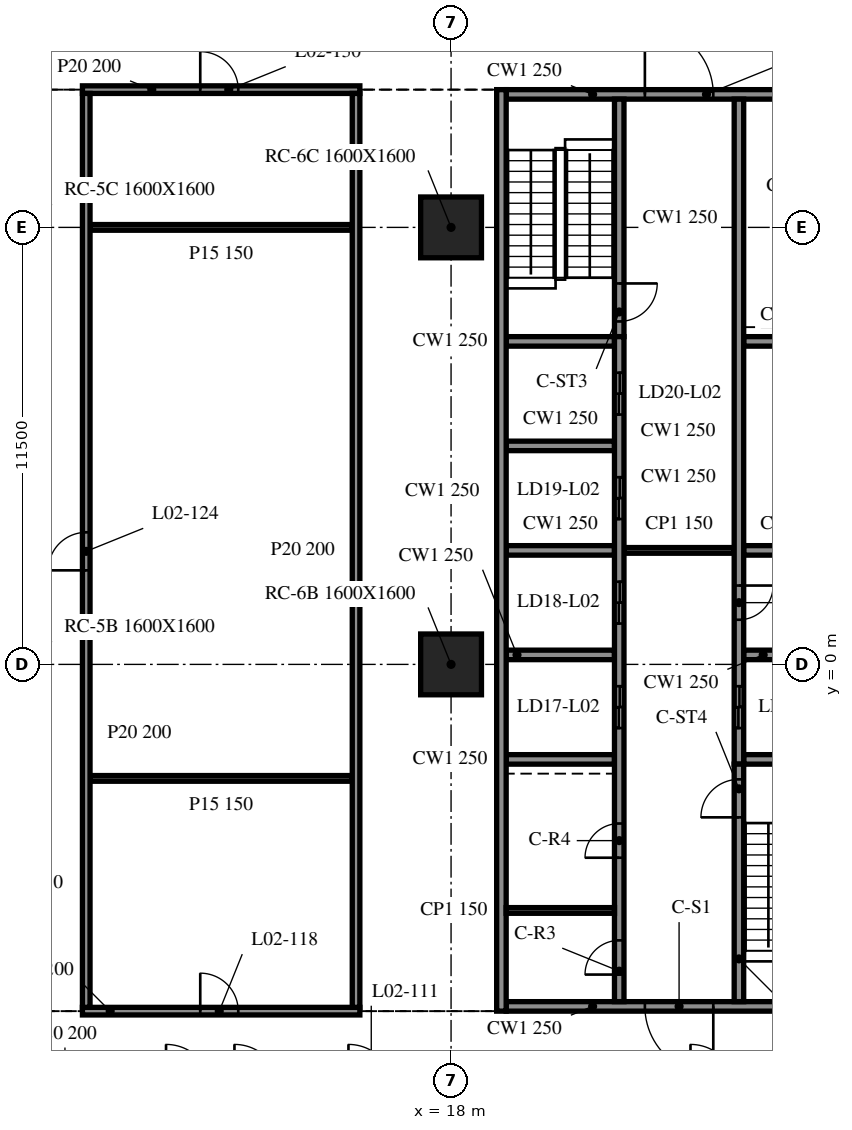
"""IFC4 building model, lengths in metres.
Left out: names, types, materials, properties, quantities, classifications, styles, units other than length and angle.
Written with IfcOpenShell. Run it as: python <this file> out.ifc"""

import sys

from ifc_helpers import new_model, si_unit, direction, frame, frame_2d, origin, origin_2d, place, context, subcontext, project, spatial, rectangle, extrude, element, fill, save


model = new_model("IFC4")
c1 = context("Model", 3, precision=1e-05, world=origin(), true_north=direction((0.0, 1.0)))
c2 = subcontext(c1, "Body", "Model", "MODEL_VIEW")
j1 = project(units=[si_unit("LENGTHUNIT", "METRE"), si_unit("PLANEANGLEUNIT", "RADIAN")], contexts=[c1])
p1 = place(None, origin())
s1 = spatial("IfcSite", under=j1, at=p1, CompositionType="ELEMENT")
p2 = place(p1, origin())
s2 = spatial("IfcBuilding", under=s1, at=p2, CompositionType="ELEMENT")
p3 = place(p2, frame((0.0, 0.0, 11.5)))
s3 = spatial("IfcBuildingStorey", under=s2, at=p3, CompositionType="ELEMENT", Elevation=11.5)
for number, where, z_axis, x_axis in (
    (1, (18.0, 0.0, -0.34), (0.0, 0.0, 1.0), (1.0, 0.0, 0.0)),
    (2, (18.0, 11.5, -0.34), (0.0, 0.0, 1.0), (1.0, 0.0, 0.0)),
):
    element("IfcColumn", number, at=place(p3, frame(where, z_axis=z_axis, x_axis=x_axis)), inside=s3, PredefinedType="COLUMN", context=c2, shape_type="SweptSolid", body=[
        extrude(rectangle(XDim=1.6, YDim=1.6, at=origin_2d()), origin(), (0.0, 0.0, 1.0), 4.3),
    ])
p4 = place(p3, frame((19.325, 15.125, 0.0), z_axis=(0.0, 0.0, 1.0), x_axis=(0.0, -1.0, 0.0)))
e3 = element("IfcWall", 3, at=p4, inside=s3, PredefinedType="SOLIDWALL", context=c2, shape_type="SweptSolid", body=[
    extrude(rectangle(XDim=24.25, YDim=0.25, at=frame_2d((12.125, 0.0))), origin(), (0.0, 0.0, 1.0), 3.96),
])
p5 = place(p3, frame((28.55, -9.0, 0.0), z_axis=(0.0, 0.0, 1.0), x_axis=(-1.0, 0.0, 0.0)))
e4 = element("IfcWall", 4, at=p5, inside=s3, PredefinedType="SOLIDWALL", context=c2, shape_type="SweptSolid", body=[
    extrude(rectangle(XDim=9.1, YDim=0.25, at=frame_2d((4.55, 0.0))), origin(), (0.0, 0.0, 1.0), 3.96),
])
p6 = place(p5, frame((3.65, 0.0, 0.0)))
e5 = element("IfcOpeningElement", 5, at=p6, cuts=e4, PredefinedType="OPENING", context=c2, shape_type="SweptSolid", body=[
    extrude(rectangle(XDim=1.8, YDim=2.1, at=frame_2d((0.9, 1.05))), frame((0.0, 0.135, 0.0), z_axis=(0.0, -1.0, 0.0), x_axis=(1.0, 0.0, 0.0)), (0.0, 0.0, 1.0), 0.27),
])
p7 = place(p3, frame((19.45, 15.0, 0.0), z_axis=(0.0, 0.0, 1.0), x_axis=(1.0, 0.0, 0.0)))
e6 = element("IfcWall", 6, at=p7, inside=s3, PredefinedType="SOLIDWALL", context=c2, shape_type="SweptSolid", body=[
    extrude(rectangle(XDim=9.1, YDim=0.25, at=frame_2d((4.55, 0.0))), origin(), (0.0, 0.0, 1.0), 3.96),
])
p8 = place(p7, frame((3.65, 0.0, 0.0)))
e7 = element("IfcOpeningElement", 7, at=p8, cuts=e6, PredefinedType="OPENING", context=c2, shape_type="SweptSolid", body=[
    extrude(rectangle(XDim=1.8, YDim=2.1, at=frame_2d((0.9, 1.05))), frame((0.0, 0.135, 0.0), z_axis=(0.0, -1.0, 0.0), x_axis=(1.0, 0.0, 0.0)), (0.0, 0.0, 1.0), 0.27),
])
p9 = place(p3, frame((22.425, -8.875, 0.0), z_axis=(0.0, 0.0, 1.0), x_axis=(0.0, 1.0, 0.0)))
e8 = element("IfcWall", 8, at=p9, inside=s3, PredefinedType="SOLIDWALL", context=c2, shape_type="SweptSolid", body=[
    extrude(rectangle(XDim=17.5, YDim=0.25, at=frame_2d((8.75, 0.0))), origin(), (0.0, 0.0, 1.0), 3.96),
])
p10 = place(p9, frame((7.2, 0.0, 0.0)))
e9 = element("IfcOpeningElement", 9, at=p10, cuts=e8, PredefinedType="OPENING", context=c2, shape_type="SweptSolid", body=[
    extrude(rectangle(XDim=1.1, YDim=2.1, at=frame_2d((0.55, 1.05))), frame((0.0, 0.135, 0.0), z_axis=(0.0, -1.0, 0.0), x_axis=(1.0, 0.0, 0.0)), (0.0, 0.0, 1.0), 0.27),
])
p11 = place(p9, frame((9.95, 0.0, 0.0)))
e10 = element("IfcOpeningElement", 10, at=p11, cuts=e8, PredefinedType="OPENING", context=c2, shape_type="SweptSolid", body=[
    extrude(rectangle(XDim=1.1, YDim=2.1, at=frame_2d((0.55, 1.05))), frame((0.0, 0.135, 0.0), z_axis=(0.0, -1.0, 0.0), x_axis=(1.0, 0.0, 0.0)), (0.0, 0.0, 1.0), 0.27),
])
p12 = place(p9, frame((12.7, 0.0, 0.0)))
e11 = element("IfcOpeningElement", 11, at=p12, cuts=e8, PredefinedType="OPENING", context=c2, shape_type="SweptSolid", body=[
    extrude(rectangle(XDim=1.1, YDim=2.1, at=frame_2d((0.55, 1.05))), frame((0.0, 0.135, 0.0), z_axis=(0.0, -1.0, 0.0), x_axis=(1.0, 0.0, 0.0)), (0.0, 0.0, 1.0), 0.27),
])
p13 = place(p9, frame((15.45, 0.0, 0.0)))
e12 = element("IfcOpeningElement", 12, at=p13, cuts=e8, PredefinedType="OPENING", context=c2, shape_type="SweptSolid", body=[
    extrude(rectangle(XDim=1.1, YDim=2.1, at=frame_2d((0.55, 1.05))), frame((0.0, 0.135, 0.0), z_axis=(0.0, -1.0, 0.0), x_axis=(1.0, 0.0, 0.0)), (0.0, 0.0, 1.0), 0.27),
])
p14 = place(p9, frame((0.712, 0.0, 0.0)))
e13 = element("IfcOpeningElement", 13, at=p14, cuts=e8, PredefinedType="OPENING", context=c2, shape_type="SweptSolid", body=[
    extrude(rectangle(XDim=0.9, YDim=2.1, at=frame_2d((0.45, 1.05))), frame((0.0, 0.135, 0.0), z_axis=(0.0, -1.0, 0.0), x_axis=(1.0, 0.0, 0.0)), (0.0, 0.0, 1.0), 0.27),
])
p15 = place(p9, frame((3.788, 0.0, 0.0)))
e14 = element("IfcOpeningElement", 14, at=p15, cuts=e8, PredefinedType="OPENING", context=c2, shape_type="SweptSolid", body=[
    extrude(rectangle(XDim=0.9, YDim=2.1, at=frame_2d((0.45, 1.05))), frame((0.0, 0.135, 0.0), z_axis=(0.0, -1.0, 0.0), x_axis=(1.0, 0.0, 0.0)), (0.0, 0.0, 1.0), 0.27),
])
p16 = place(p3, frame((22.425, 14.875, 0.0), z_axis=(0.0, 0.0, 1.0), x_axis=(0.0, -1.0, 0.0)))
e15 = element("IfcWall", 15, at=p16, inside=s3, PredefinedType="SOLIDWALL", context=c2, shape_type="SweptSolid", body=[
    extrude(rectangle(XDim=6.25, YDim=0.25, at=frame_2d((3.125, 0.0))), origin(), (0.0, 0.0, 1.0), 3.96),
])
p17 = place(p16, frame((4.85, 0.0, 0.0)))
e16 = element("IfcOpeningElement", 16, at=p17, cuts=e15, PredefinedType="OPENING", context=c2, shape_type="SweptSolid", body=[
    extrude(rectangle(XDim=1.0, YDim=2.1, at=frame_2d((0.5, 1.05))), frame((0.0, 0.135, 0.0), z_axis=(0.0, -1.0, 0.0), x_axis=(1.0, 0.0, 0.0)), (0.0, 0.0, 1.0), 0.27),
])
p18 = place(p3, frame((25.575, -8.875, 0.0), z_axis=(0.0, 0.0, 1.0), x_axis=(0.0, 1.0, 0.0)))
e17 = element("IfcWall", 17, at=p18, inside=s3, PredefinedType="SOLIDWALL", context=c2, shape_type="SweptSolid", body=[
    extrude(rectangle(XDim=6.25, YDim=0.25, at=frame_2d((3.125, 0.0))), origin(), (0.0, 0.0, 1.0), 3.96),
])
p19 = place(p18, frame((4.85, 0.0, 0.0)))
e18 = element("IfcOpeningElement", 18, at=p19, cuts=e17, PredefinedType="OPENING", context=c2, shape_type="SweptSolid", body=[
    extrude(rectangle(XDim=1.0, YDim=2.1, at=frame_2d((0.5, 1.05))), frame((0.0, 0.135, 0.0), z_axis=(0.0, -1.0, 0.0), x_axis=(1.0, 0.0, 0.0)), (0.0, 0.0, 1.0), 0.27),
])
p20 = place(p3, frame((25.575, 14.875, 0.0), z_axis=(0.0, 0.0, 1.0), x_axis=(0.0, -1.0, 0.0)))
e19 = element("IfcWall", 19, at=p20, inside=s3, PredefinedType="SOLIDWALL", context=c2, shape_type="SweptSolid", body=[
    extrude(rectangle(XDim=17.5, YDim=0.25, at=frame_2d((8.75, 0.0))), origin(), (0.0, 0.0, 1.0), 3.96),
])
p21 = place(p20, frame((15.45, 0.0, 0.0)))
e20 = element("IfcOpeningElement", 20, at=p21, cuts=e19, PredefinedType="OPENING", context=c2, shape_type="SweptSolid", body=[
    extrude(rectangle(XDim=1.1, YDim=2.1, at=frame_2d((0.55, 1.05))), frame((0.0, 0.135, 0.0), z_axis=(0.0, -1.0, 0.0), x_axis=(1.0, 0.0, 0.0)), (0.0, 0.0, 1.0), 0.27),
])
p22 = place(p20, frame((12.8, 0.0, 0.0)))
e21 = element("IfcOpeningElement", 21, at=p22, cuts=e19, PredefinedType="OPENING", context=c2, shape_type="SweptSolid", body=[
    extrude(rectangle(XDim=0.9, YDim=2.1, at=frame_2d((0.45, 1.05))), frame((0.0, 0.135, 0.0), z_axis=(0.0, -1.0, 0.0), x_axis=(1.0, 0.0, 0.0)), (0.0, 0.0, 1.0), 0.27),
])
for number, where, z_axis, x_axis in (
    (22, (19.45, -2.5, 0.0), (0.0, 0.0, 1.0), (1.0, 0.0, 0.0)),
    (23, (19.45, 0.25, 0.0), (0.0, 0.0, 1.0), (1.0, 0.0, 0.0)),
    (24, (19.45, 3.0, 0.0), (0.0, 0.0, 1.0), (1.0, 0.0, 0.0)),
    (25, (19.45, 5.75, 0.0), (0.0, 0.0, 1.0), (1.0, 0.0, 0.0)),
    (26, (19.45, 8.5, 0.0), (0.0, 0.0, 1.0), (1.0, 0.0, 0.0)),
    (27, (25.7, -2.5, 0.0), (0.0, 0.0, 1.0), (1.0, 0.0, 0.0)),
    (28, (25.7, 0.25, 0.0), (0.0, 0.0, 1.0), (1.0, 0.0, 0.0)),
    (29, (25.7, 3.0, 0.0), (0.0, 0.0, 1.0), (1.0, 0.0, 0.0)),
    (30, (25.7, 8.5, 0.0), (0.0, 0.0, 1.0), (1.0, 0.0, 0.0)),
):
    element("IfcWall", number, at=place(p3, frame(where, z_axis=z_axis, x_axis=x_axis)), inside=s3, PredefinedType="SOLIDWALL", context=c2, shape_type="SweptSolid", body=[
        extrude(rectangle(XDim=2.85, YDim=0.25, at=frame_2d((1.425, 0.0))), origin(), (0.0, 0.0, 1.0), 3.96),
    ])
p23 = place(p3, frame((22.55, 3.0, 0.0), z_axis=(0.0, 0.0, 1.0), x_axis=(1.0, 0.0, 0.0)))
e31 = element("IfcWall", 31, at=p23, inside=s3, PredefinedType="PARTITIONING", context=c2, shape_type="SweptSolid", body=[
    extrude(rectangle(XDim=2.9, YDim=0.15, at=frame_2d((1.45, 0.0))), origin(), (0.0, 0.0, 1.0), 3.96),
])
p24 = place(p3, frame((19.45, -6.475, 0.0), z_axis=(0.0, 0.0, 1.0), x_axis=(1.0, 0.0, 0.0)))
e32 = element("IfcWall", 32, at=p24, inside=s3, PredefinedType="PARTITIONING", context=c2, shape_type="SweptSolid", body=[
    extrude(rectangle(XDim=2.85, YDim=0.15, at=frame_2d((1.425, 0.0))), origin(), (0.0, 0.0, 1.0), 3.96),
])
p25 = place(p3, frame((8.3, -9.125, 0.0), z_axis=(0.0, 0.0, 1.0), x_axis=(1.0, 0.0, 0.0)))
e33 = element("IfcWall", 33, at=p25, inside=s3, PredefinedType="PARTITIONING", context=c2, shape_type="SweptSolid", body=[
    extrude(rectangle(XDim=7.3, YDim=0.2, at=frame_2d((3.65, 0.0))), origin(), (0.0, 0.0, 1.0), 3.96),
])
p26 = place(p25, frame((3.1, 0.0, 0.0)))
e34 = element("IfcOpeningElement", 34, at=p26, cuts=e33, PredefinedType="OPENING", context=c2, shape_type="SweptSolid", body=[
    extrude(rectangle(XDim=1.0, YDim=2.1, at=frame_2d((0.5, 1.05))), frame((0.0, 0.11, 0.0), z_axis=(0.0, -1.0, 0.0), x_axis=(1.0, 0.0, 0.0)), (0.0, 0.0, 1.0), 0.22),
])
for number, where, z_axis, x_axis in (
    (35, (8.5, -3.0, 0.0), (0.0, 0.0, 1.0), (1.0, 0.0, 0.0)),
    (36, (8.5, 11.5, 0.0), (0.0, 0.0, 1.0), (1.0, 0.0, 0.0)),
):
    element("IfcWall", number, at=place(p3, frame(where, z_axis=z_axis, x_axis=x_axis)), inside=s3, PredefinedType="PARTITIONING", context=c2, shape_type="SweptSolid", body=[
        extrude(rectangle(XDim=6.9, YDim=0.15, at=frame_2d((3.45, 0.0))), origin(), (0.0, 0.0, 1.0), 3.96),
    ])
p27 = place(p3, frame((8.3, 15.125, 0.0), z_axis=(0.0, 0.0, 1.0), x_axis=(1.0, 0.0, 0.0)))
e37 = element("IfcWall", 37, at=p27, inside=s3, PredefinedType="PARTITIONING", context=c2, shape_type="SweptSolid", body=[
    extrude(rectangle(XDim=7.3, YDim=0.2, at=frame_2d((3.65, 0.0))), origin(), (0.0, 0.0, 1.0), 3.96),
])
p28 = place(p27, frame((3.1, 0.0, 0.0)))
e38 = element("IfcOpeningElement", 38, at=p28, cuts=e37, PredefinedType="OPENING", context=c2, shape_type="SweptSolid", body=[
    extrude(rectangle(XDim=1.0, YDim=2.1, at=frame_2d((0.5, 1.05))), frame((0.0, 0.11, 0.0), z_axis=(0.0, -1.0, 0.0), x_axis=(1.0, 0.0, 0.0)), (0.0, 0.0, 1.0), 0.22),
])
p29 = place(p3, frame((8.4, -9.025, 0.0), z_axis=(0.0, 0.0, 1.0), x_axis=(0.0, 1.0, 0.0)))
e39 = element("IfcWall", 39, at=p29, inside=s3, PredefinedType="PARTITIONING", context=c2, shape_type="SweptSolid", body=[
    extrude(rectangle(XDim=24.05, YDim=0.2, at=frame_2d((12.025, 0.0))), origin(), (0.0, 0.0, 1.0), 3.96),
])
p30 = place(p29, frame((11.5, 0.0, 0.0)))
e40 = element("IfcOpeningElement", 40, at=p30, cuts=e39, PredefinedType="OPENING", context=c2, shape_type="SweptSolid", body=[
    extrude(rectangle(XDim=1.0, YDim=2.1, at=frame_2d((0.5, 1.05))), frame((0.0, 0.11, 0.0), z_axis=(0.0, -1.0, 0.0), x_axis=(1.0, 0.0, 0.0)), (0.0, 0.0, 1.0), 0.22),
])
p31 = place(p3, frame((15.5, -9.025, 0.0), z_axis=(0.0, 0.0, 1.0), x_axis=(0.0, 1.0, 0.0)))
e41 = element("IfcWall", 41, at=p31, inside=s3, PredefinedType="PARTITIONING", context=c2, shape_type="SweptSolid", body=[
    extrude(rectangle(XDim=24.05, YDim=0.2, at=frame_2d((12.025, 0.0))), origin(), (0.0, 0.0, 1.0), 3.96),
])
p32 = place(p6, origin())
e42 = element("IfcDoor", 42, at=p32, inside=s3, OperationType="DOUBLE_DOOR_SINGLE_SWING", PredefinedType="DOOR", context=c2, shape_type="SweptSolid", body=[
    extrude(rectangle(XDim=1.8, YDim=2.1, at=frame_2d((0.9, 1.05))), frame((0.0, 0.025, 0.0), z_axis=(0.0, -1.0, 0.0), x_axis=(1.0, 0.0, 0.0)), (0.0, 0.0, 1.0), 0.05),
])
fill(e5, e42)
p33 = place(p8, origin())
e43 = element("IfcDoor", 43, at=p33, inside=s3, OperationType="DOUBLE_DOOR_SINGLE_SWING", PredefinedType="DOOR", context=c2, shape_type="SweptSolid", body=[
    extrude(rectangle(XDim=1.8, YDim=2.1, at=frame_2d((0.9, 1.05))), frame((0.0, 0.025, 0.0), z_axis=(0.0, -1.0, 0.0), x_axis=(1.0, 0.0, 0.0)), (0.0, 0.0, 1.0), 0.05),
])
fill(e7, e43)
p34 = place(p21, origin())
e44 = element("IfcDoor", 44, at=p34, inside=s3, OperationType="DOUBLE_DOOR_SLIDING", PredefinedType="DOOR", context=c2, shape_type="SweptSolid", body=[
    extrude(rectangle(XDim=1.1, YDim=2.1, at=frame_2d((0.55, 1.05))), frame((0.0, 0.025, 0.0), z_axis=(0.0, -1.0, 0.0), x_axis=(1.0, 0.0, 0.0)), (0.0, 0.0, 1.0), 0.05),
])
fill(e20, e44)
p35 = place(p10, origin())
e45 = element("IfcDoor", 45, at=p35, inside=s3, OperationType="DOUBLE_DOOR_SLIDING", PredefinedType="DOOR", context=c2, shape_type="SweptSolid", body=[
    extrude(rectangle(XDim=1.1, YDim=2.1, at=frame_2d((0.55, 1.05))), frame((0.0, 0.025, 0.0), z_axis=(0.0, -1.0, 0.0), x_axis=(1.0, 0.0, 0.0)), (0.0, 0.0, 1.0), 0.05),
])
fill(e9, e45)
p36 = place(p11, origin())
e46 = element("IfcDoor", 46, at=p36, inside=s3, OperationType="DOUBLE_DOOR_SLIDING", PredefinedType="DOOR", context=c2, shape_type="SweptSolid", body=[
    extrude(rectangle(XDim=1.1, YDim=2.1, at=frame_2d((0.55, 1.05))), frame((0.0, 0.025, 0.0), z_axis=(0.0, -1.0, 0.0), x_axis=(1.0, 0.0, 0.0)), (0.0, 0.0, 1.0), 0.05),
])
fill(e10, e46)
p37 = place(p12, origin())
e47 = element("IfcDoor", 47, at=p37, inside=s3, OperationType="DOUBLE_DOOR_SLIDING", PredefinedType="DOOR", context=c2, shape_type="SweptSolid", body=[
    extrude(rectangle(XDim=1.1, YDim=2.1, at=frame_2d((0.55, 1.05))), frame((0.0, 0.025, 0.0), z_axis=(0.0, -1.0, 0.0), x_axis=(1.0, 0.0, 0.0)), (0.0, 0.0, 1.0), 0.05),
])
fill(e11, e47)
p38 = place(p13, origin())
e48 = element("IfcDoor", 48, at=p38, inside=s3, OperationType="DOUBLE_DOOR_SLIDING", PredefinedType="DOOR", context=c2, shape_type="SweptSolid", body=[
    extrude(rectangle(XDim=1.1, YDim=2.1, at=frame_2d((0.55, 1.05))), frame((0.0, 0.025, 0.0), z_axis=(0.0, -1.0, 0.0), x_axis=(1.0, 0.0, 0.0)), (0.0, 0.0, 1.0), 0.05),
])
fill(e12, e48)
p39 = place(p22, origin())
e49 = element("IfcDoor", 49, at=p39, inside=s3, OperationType="SINGLE_SWING_LEFT", PredefinedType="DOOR", context=c2, shape_type="SweptSolid", body=[
    extrude(rectangle(XDim=0.9, YDim=2.1, at=frame_2d((0.45, 1.05))), frame((0.0, 0.025, 0.0), z_axis=(0.0, -1.0, 0.0), x_axis=(1.0, 0.0, 0.0)), (0.0, 0.0, 1.0), 0.05),
])
fill(e21, e49)
p40 = place(p14, origin())
e50 = element("IfcDoor", 50, at=p40, inside=s3, OperationType="SINGLE_SWING_LEFT", PredefinedType="DOOR", context=c2, shape_type="SweptSolid", body=[
    extrude(rectangle(XDim=0.9, YDim=2.1, at=frame_2d((0.45, 1.05))), frame((0.0, 0.025, 0.0), z_axis=(0.0, -1.0, 0.0), x_axis=(1.0, 0.0, 0.0)), (0.0, 0.0, 1.0), 0.05),
])
fill(e13, e50)
p41 = place(p15, origin())
e51 = element("IfcDoor", 51, at=p41, inside=s3, OperationType="SINGLE_SWING_RIGHT", PredefinedType="DOOR", context=c2, shape_type="SweptSolid", body=[
    extrude(rectangle(XDim=0.9, YDim=2.1, at=frame_2d((0.45, 1.05))), frame((0.0, 0.025, 0.0), z_axis=(0.0, -1.0, 0.0), x_axis=(1.0, 0.0, 0.0)), (0.0, 0.0, 1.0), 0.05),
])
fill(e14, e51)
p42 = place(p17, origin())
e52 = element("IfcDoor", 52, at=p42, inside=s3, OperationType="SINGLE_SWING_RIGHT", PredefinedType="DOOR", context=c2, shape_type="SweptSolid", body=[
    extrude(rectangle(XDim=1.0, YDim=2.1, at=frame_2d((0.5, 1.05))), frame((0.0, 0.025, 0.0), z_axis=(0.0, -1.0, 0.0), x_axis=(1.0, 0.0, 0.0)), (0.0, 0.0, 1.0), 0.05),
])
fill(e16, e52)
p43 = place(p19, origin())
e53 = element("IfcDoor", 53, at=p43, inside=s3, OperationType="SINGLE_SWING_LEFT", PredefinedType="DOOR", context=c2, shape_type="SweptSolid", body=[
    extrude(rectangle(XDim=1.0, YDim=2.1, at=frame_2d((0.5, 1.05))), frame((0.0, 0.025, 0.0), z_axis=(0.0, -1.0, 0.0), x_axis=(1.0, 0.0, 0.0)), (0.0, 0.0, 1.0), 0.05),
])
fill(e18, e53)
p44 = place(p26, origin())
e54 = element("IfcDoor", 54, at=p44, inside=s3, OperationType="SINGLE_SWING_LEFT", PredefinedType="DOOR", context=c2, shape_type="SweptSolid", body=[
    extrude(rectangle(XDim=1.0, YDim=2.1, at=frame_2d((0.5, 1.05))), frame((0.0, 0.025, 0.0), z_axis=(0.0, -1.0, 0.0), x_axis=(1.0, 0.0, 0.0)), (0.0, 0.0, 1.0), 0.05),
])
fill(e34, e54)
p45 = place(p30, origin())
e55 = element("IfcDoor", 55, at=p45, inside=s3, OperationType="SINGLE_SWING_RIGHT", PredefinedType="DOOR", context=c2, shape_type="SweptSolid", body=[
    extrude(rectangle(XDim=1.0, YDim=2.1, at=frame_2d((0.5, 1.05))), frame((0.0, 0.025, 0.0), z_axis=(0.0, -1.0, 0.0), x_axis=(1.0, 0.0, 0.0)), (0.0, 0.0, 1.0), 0.05),
])
fill(e40, e55)
p46 = place(p28, origin())
e56 = element("IfcDoor", 56, at=p46, inside=s3, OperationType="SINGLE_SWING_RIGHT", PredefinedType="DOOR", context=c2, shape_type="SweptSolid", body=[
    extrude(rectangle(XDim=1.0, YDim=2.1, at=frame_2d((0.5, 1.05))), frame((0.0, 0.025, 0.0), z_axis=(0.0, -1.0, 0.0), x_axis=(1.0, 0.0, 0.0)), (0.0, 0.0, 1.0), 0.05),
])
fill(e38, e56)
save(model, sys.argv[1])
